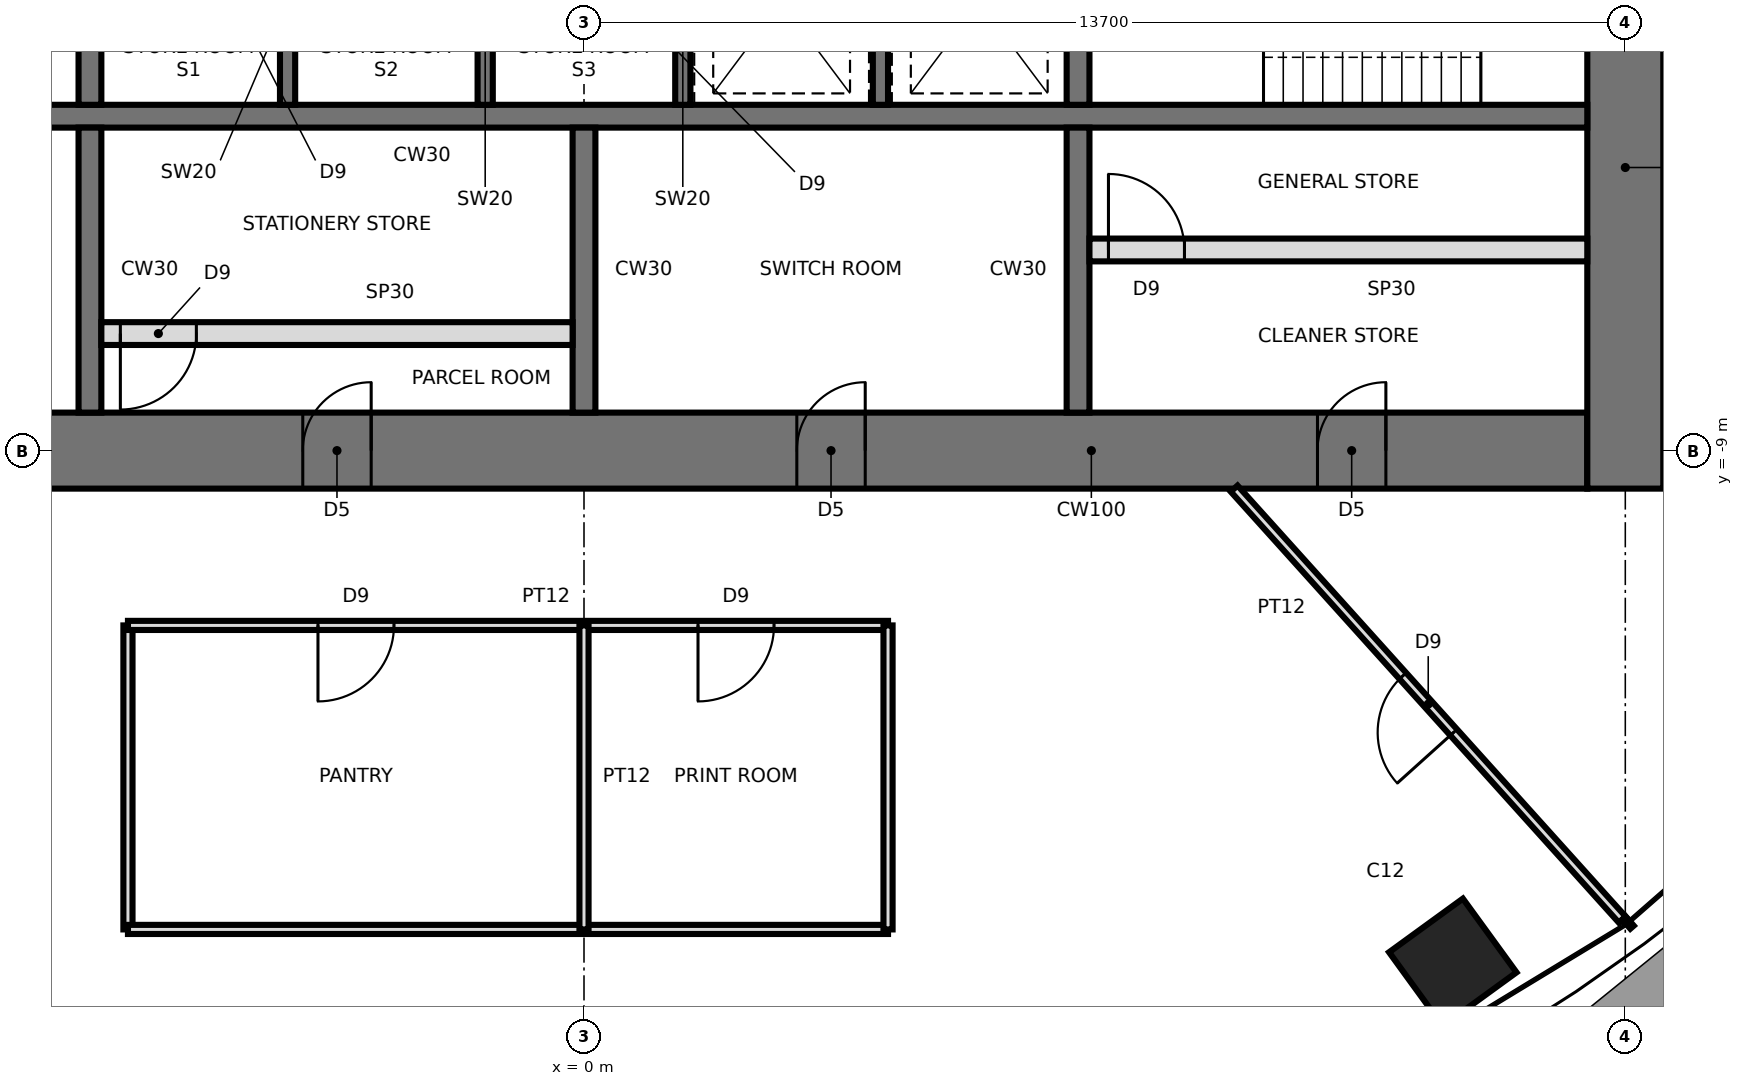
"""IFC4 building model, lengths in metres.
Left out: names, types, materials, properties, quantities, classifications, styles, units other than length and angle.
Written with IfcOpenShell. Run it as: python <this file> out.ifc"""

import sys

from ifc_helpers import new_model, si_unit, direction, frame, frame_2d, origin, origin_2d, place, context, subcontext, project, spatial, rectangle, extrude, element, fill, save


model = new_model("IFC4")
c1 = context("Model", 3, precision=1e-05, world=origin(), true_north=direction((0.0, 1.0)))
c2 = subcontext(c1, "Body", "Model", "MODEL_VIEW")
j1 = project(units=[si_unit("LENGTHUNIT", "METRE"), si_unit("PLANEANGLEUNIT", "RADIAN")], contexts=[c1])
p1 = place(None, origin())
s1 = spatial("IfcSite", under=j1, at=p1, CompositionType="ELEMENT")
p2 = place(p1, origin())
s2 = spatial("IfcBuilding", under=s1, at=p2, CompositionType="ELEMENT")
p3 = place(p2, frame((0.0, 0.0, 264.4)))
s3 = spatial("IfcBuildingStorey", under=s2, at=p3, CompositionType="ELEMENT", Elevation=264.4)
p4 = place(p3, frame((11.43, -15.733, 0.0), z_axis=(0.0, 0.0, 1.0), x_axis=(0.587785252292, -0.809016994375, 0.0)))
e1 = element("IfcColumn", 1, at=p4, inside=s3, PredefinedType="COLUMN", context=c2, shape_type="SweptSolid", body=[
    extrude(rectangle(XDim=1.2, YDim=1.2, at=origin_2d()), origin(), (0.0, 0.0, 1.0), 4.2),
])
p5 = place(p3, frame((-13.2, -9.0, 0.0), z_axis=(0.0, 0.0, 1.0), x_axis=(1.0, 0.0, 0.0)))
e2 = element("IfcWall", 2, at=p5, inside=s3, PredefinedType="SHEAR", context=c2, shape_type="SweptSolid", body=[
    extrude(rectangle(XDim=26.4, YDim=1.0, at=frame_2d((13.2, 0.0))), origin(), (0.0, 0.0, 1.0), 4.2),
])
p6 = place(p5, frame((2.65, 0.0, 0.0)))
e3 = element("IfcOpeningElement", 3, at=p6, cuts=e2, PredefinedType="OPENING", context=c2, shape_type="SweptSolid", body=[
    extrude(rectangle(XDim=0.9, YDim=2.1, at=frame_2d((0.45, 1.05))), frame((0.0, 0.51, 0.0), z_axis=(0.0, -1.0, 0.0), x_axis=(1.0, 0.0, 0.0)), (0.0, 0.0, 1.0), 1.02),
])
p7 = place(p5, frame((9.5, 0.0, 0.0)))
e4 = element("IfcOpeningElement", 4, at=p7, cuts=e2, PredefinedType="OPENING", context=c2, shape_type="SweptSolid", body=[
    extrude(rectangle(XDim=0.9, YDim=2.1, at=frame_2d((0.45, 1.05))), frame((0.0, 0.51, 0.0), z_axis=(0.0, -1.0, 0.0), x_axis=(1.0, 0.0, 0.0)), (0.0, 0.0, 1.0), 1.02),
])
p8 = place(p5, frame((16.0, 0.0, 0.0)))
e5 = element("IfcOpeningElement", 5, at=p8, cuts=e2, PredefinedType="OPENING", context=c2, shape_type="SweptSolid", body=[
    extrude(rectangle(XDim=0.9, YDim=2.1, at=frame_2d((0.45, 1.05))), frame((0.0, 0.51, 0.0), z_axis=(0.0, -1.0, 0.0), x_axis=(1.0, 0.0, 0.0)), (0.0, 0.0, 1.0), 1.02),
])
p9 = place(p5, frame((22.85, 0.0, 0.0)))
e6 = element("IfcOpeningElement", 6, at=p9, cuts=e2, PredefinedType="OPENING", context=c2, shape_type="SweptSolid", body=[
    extrude(rectangle(XDim=0.9, YDim=2.1, at=frame_2d((0.45, 1.05))), frame((0.0, 0.51, 0.0), z_axis=(0.0, -1.0, 0.0), x_axis=(1.0, 0.0, 0.0)), (0.0, 0.0, 1.0), 1.02),
])
p10 = place(p3, frame((13.7, -9.5, 0.0), z_axis=(0.0, 0.0, 1.0), x_axis=(0.0, 1.0, 0.0)))
e7 = element("IfcWall", 7, at=p10, inside=s3, PredefinedType="SHEAR", context=c2, shape_type="SweptSolid", body=[
    extrude(rectangle(XDim=19.0, YDim=1.0, at=frame_2d((9.5, 0.0))), origin(), (0.0, 0.0, 1.0), 4.2),
])
p11 = place(p10, frame((8.6, 0.0, 0.0)))
e8 = element("IfcOpeningElement", 8, at=p11, cuts=e7, PredefinedType="OPENING", context=c2, shape_type="SweptSolid", body=[
    extrude(rectangle(XDim=1.8, YDim=2.4, at=frame_2d((0.9, 1.2))), frame((0.0, 0.51, 0.0), z_axis=(0.0, -1.0, 0.0), x_axis=(1.0, 0.0, 0.0)), (0.0, 0.0, 1.0), 1.02),
])
p12 = place(p3, frame((-13.2, -4.6, 0.0), z_axis=(0.0, 0.0, 1.0), x_axis=(1.0, 0.0, 0.0)))
e9 = element("IfcWall", 9, at=p12, inside=s3, PredefinedType="SHEAR", context=c2, shape_type="SweptSolid", body=[
    extrude(rectangle(XDim=26.4, YDim=0.3, at=frame_2d((13.2, 0.0))), origin(), (0.0, 0.0, 1.0), 4.2),
])
p13 = place(p3, frame((-6.5, -1.75, 0.0), z_axis=(0.0, 0.0, 1.0), x_axis=(0.0, -1.0, 0.0)))
e10 = element("IfcWall", 10, at=p13, inside=s3, PredefinedType="SHEAR", context=c2, shape_type="SweptSolid", body=[
    extrude(rectangle(XDim=2.7, YDim=0.3, at=frame_2d((1.35, 0.0))), origin(), (0.0, 0.0, 1.0), 4.2),
])
p14 = place(p3, frame((-6.5, -4.75, 0.0), z_axis=(0.0, 0.0, 1.0), x_axis=(0.0, -1.0, 0.0)))
e11 = element("IfcWall", 11, at=p14, inside=s3, PredefinedType="SHEAR", context=c2, shape_type="SweptSolid", body=[
    extrude(rectangle(XDim=3.75, YDim=0.3, at=frame_2d((1.875, 0.0))), origin(), (0.0, 0.0, 1.0), 4.2),
])
p15 = place(p3, frame((6.5, -1.75, 0.0), z_axis=(0.0, 0.0, 1.0), x_axis=(0.0, -1.0, 0.0)))
e12 = element("IfcWall", 12, at=p15, inside=s3, PredefinedType="SHEAR", context=c2, shape_type="SweptSolid", body=[
    extrude(rectangle(XDim=2.7, YDim=0.3, at=frame_2d((1.35, 0.0))), origin(), (0.0, 0.0, 1.0), 4.2),
])
p16 = place(p3, frame((6.5, -4.75, 0.0), z_axis=(0.0, 0.0, 1.0), x_axis=(0.0, -1.0, 0.0)))
e13 = element("IfcWall", 13, at=p16, inside=s3, PredefinedType="SHEAR", context=c2, shape_type="SweptSolid", body=[
    extrude(rectangle(XDim=3.75, YDim=0.3, at=frame_2d((1.875, 0.0))), origin(), (0.0, 0.0, 1.0), 4.2),
])
for number, where, z_axis, x_axis in (
    (14, (-3.9, -1.75, 0.0), (0.0, 0.0, 1.0), (0.0, -1.0, 0.0)),
    (15, (-1.3, -1.75, 0.0), (0.0, 0.0, 1.0), (0.0, -1.0, 0.0)),
    (16, (1.3, -1.75, 0.0), (0.0, 0.0, 1.0), (0.0, -1.0, 0.0)),
    (17, (3.9, -1.75, 0.0), (0.0, 0.0, 1.0), (0.0, -1.0, 0.0)),
):
    element("IfcWall", number, at=place(p3, frame(where, z_axis=z_axis, x_axis=x_axis)), inside=s3, PredefinedType="SHEAR", context=c2, shape_type="SweptSolid", body=[
        extrude(rectangle(XDim=2.7, YDim=0.2, at=frame_2d((1.35, 0.0))), origin(), (0.0, 0.0, 1.0), 4.2),
    ])
p17 = place(p3, frame((0.0, -4.75, 0.0), z_axis=(0.0, 0.0, 1.0), x_axis=(0.0, -1.0, 0.0)))
e18 = element("IfcWall", 18, at=p17, inside=s3, PredefinedType="SHEAR", context=c2, shape_type="SweptSolid", body=[
    extrude(rectangle(XDim=3.75, YDim=0.3, at=frame_2d((1.875, 0.0))), origin(), (0.0, 0.0, 1.0), 4.2),
])
p18 = place(p3, frame((-6.35, -7.46, 0.0), z_axis=(0.0, 0.0, 1.0), x_axis=(1.0, 0.0, 0.0)))
e19 = element("IfcWall", 19, at=p18, inside=s3, PredefinedType="PARTITIONING", context=c2, shape_type="SweptSolid", body=[
    extrude(rectangle(XDim=6.2, YDim=0.3, at=frame_2d((3.1, 0.0))), origin(), (0.0, 0.0, 1.0), 4.04),
])
p19 = place(p18, frame((0.25, 0.0, 0.0)))
e20 = element("IfcOpeningElement", 20, at=p19, cuts=e19, PredefinedType="OPENING", context=c2, shape_type="SweptSolid", body=[
    extrude(rectangle(XDim=1.0, YDim=2.4, at=frame_2d((0.5, 1.2))), frame((0.0, 0.16, 0.0), z_axis=(0.0, -1.0, 0.0), x_axis=(1.0, 0.0, 0.0)), (0.0, 0.0, 1.0), 0.32),
])
p20 = place(p3, frame((6.65, -6.36, 0.0), z_axis=(0.0, 0.0, 1.0), x_axis=(1.0, 0.0, 0.0)))
e21 = element("IfcWall", 21, at=p20, inside=s3, PredefinedType="PARTITIONING", context=c2, shape_type="SweptSolid", body=[
    extrude(rectangle(XDim=6.55, YDim=0.3, at=frame_2d((3.275, 0.0))), origin(), (0.0, 0.0, 1.0), 4.04),
])
p21 = place(p20, frame((0.25, 0.0, 0.0)))
e22 = element("IfcOpeningElement", 22, at=p21, cuts=e21, PredefinedType="OPENING", context=c2, shape_type="SweptSolid", body=[
    extrude(rectangle(XDim=1.0, YDim=2.4, at=frame_2d((0.5, 1.2))), frame((0.0, 0.16, 0.0), z_axis=(0.0, -1.0, 0.0), x_axis=(1.0, 0.0, 0.0)), (0.0, 0.0, 1.0), 0.32),
])
p22 = place(p3, frame((-6.0, -15.3, 0.0), z_axis=(0.0, 0.0, 1.0), x_axis=(0.0, 1.0, 0.0)))
e23 = element("IfcWall", 23, at=p22, inside=s3, PredefinedType="PARTITIONING", context=c2, shape_type="SweptSolid", body=[
    extrude(rectangle(XDim=4.0, YDim=0.12, at=frame_2d((2.0, 0.0))), origin(), (0.0, 0.0, 1.0), 4.04),
])
p23 = place(p3, frame((-6.0, -11.3, 0.0), z_axis=(0.0, 0.0, 1.0), x_axis=(1.0, 0.0, 0.0)))
e24 = element("IfcWall", 24, at=p23, inside=s3, PredefinedType="PARTITIONING", context=c2, shape_type="SweptSolid", body=[
    extrude(rectangle(XDim=10.0, YDim=0.12, at=frame_2d((5.0, 0.0))), origin(), (0.0, 0.0, 1.0), 4.04),
])
p24 = place(p23, frame((2.5, 0.0, 0.0)))
e25 = element("IfcOpeningElement", 25, at=p24, cuts=e24, PredefinedType="OPENING", context=c2, shape_type="SweptSolid", body=[
    extrude(rectangle(XDim=1.0, YDim=2.4, at=frame_2d((0.5, 1.2))), frame((0.0, 0.07, 0.0), z_axis=(0.0, -1.0, 0.0), x_axis=(1.0, 0.0, 0.0)), (0.0, 0.0, 1.0), 0.14),
])
p25 = place(p23, frame((7.5, 0.0, 0.0)))
e26 = element("IfcOpeningElement", 26, at=p25, cuts=e24, PredefinedType="OPENING", context=c2, shape_type="SweptSolid", body=[
    extrude(rectangle(XDim=1.0, YDim=2.4, at=frame_2d((0.5, 1.2))), frame((0.0, 0.07, 0.0), z_axis=(0.0, -1.0, 0.0), x_axis=(1.0, 0.0, 0.0)), (0.0, 0.0, 1.0), 0.14),
])
p26 = place(p3, frame((4.0, -15.3, 0.0), z_axis=(0.0, 0.0, 1.0), x_axis=(-1.0, 0.0, 0.0)))
e27 = element("IfcWall", 27, at=p26, inside=s3, PredefinedType="PARTITIONING", context=c2, shape_type="SweptSolid", body=[
    extrude(rectangle(XDim=10.0, YDim=0.12, at=frame_2d((5.0, 0.0))), origin(), (0.0, 0.0, 1.0), 3.637),
])
p27 = place(p3, frame((0.0, -11.3, 0.0), z_axis=(0.0, 0.0, 1.0), x_axis=(0.0, -1.0, 0.0)))
e28 = element("IfcWall", 28, at=p27, inside=s3, PredefinedType="PARTITIONING", context=c2, shape_type="SweptSolid", body=[
    extrude(rectangle(XDim=4.0, YDim=0.12, at=frame_2d((2.0, 0.0))), origin(), (0.0, 0.0, 1.0), 3.24),
])
p28 = place(p3, frame((4.0, -11.3, 0.0), z_axis=(0.0, 0.0, 1.0), x_axis=(0.0, -1.0, 0.0)))
e29 = element("IfcWall", 29, at=p28, inside=s3, PredefinedType="PARTITIONING", context=c2, shape_type="SweptSolid", body=[
    extrude(rectangle(XDim=4.0, YDim=0.12, at=frame_2d((2.0, 0.0))), origin(), (0.0, 0.0, 1.0), 4.04),
])
p29 = place(p3, frame((13.66, -15.171, 0.0), z_axis=(0.0, 0.0, 1.0), x_axis=(-0.669137936348, 0.74313822546, 0.0)))
e30 = element("IfcWall", 30, at=p29, inside=s3, PredefinedType="PARTITIONING", context=c2, shape_type="SweptSolid", body=[
    extrude(rectangle(XDim=7.631, YDim=0.12, at=frame_2d((3.815, 0.0))), origin(), (0.0, 0.0, 1.0), 4.04),
])
p30 = place(p29, frame((3.315, 0.0, 0.0)))
e31 = element("IfcOpeningElement", 31, at=p30, cuts=e30, PredefinedType="OPENING", context=c2, shape_type="SweptSolid", body=[
    extrude(rectangle(XDim=1.0, YDim=2.4, at=frame_2d((0.5, 1.2))), frame((0.0, 0.07, 0.0), z_axis=(0.0, -1.0, 0.0), x_axis=(1.0, 0.0, 0.0)), (0.0, 0.0, 1.0), 0.14),
])
p31 = place(p7, origin())
e32 = element("IfcDoor", 32, at=p31, inside=s3, OperationType="SINGLE_SWING_RIGHT", PredefinedType="DOOR", context=c2, shape_type="SweptSolid", body=[
    extrude(rectangle(XDim=0.82, YDim=2.06, at=frame_2d((0.45, 1.03))), frame((0.0, 0.025, 0.0), z_axis=(0.0, -1.0, 0.0), x_axis=(1.0, 0.0, 0.0)), (0.0, 0.0, 1.0), 0.05),
    extrude(rectangle(XDim=0.04, YDim=2.1, at=frame_2d((0.02, 1.05))), frame((0.0, 0.25, 0.0), z_axis=(0.0, -1.0, 0.0), x_axis=(1.0, 0.0, 0.0)), (0.0, 0.0, 1.0), 0.5),
    extrude(rectangle(XDim=0.04, YDim=2.1, at=frame_2d((0.88, 1.05))), frame((0.0, 0.25, 0.0), z_axis=(0.0, -1.0, 0.0), x_axis=(1.0, 0.0, 0.0)), (0.0, 0.0, 1.0), 0.5),
    extrude(rectangle(XDim=0.82, YDim=0.04, at=frame_2d((0.45, 2.08))), frame((0.0, 0.25, 0.0), z_axis=(0.0, -1.0, 0.0), x_axis=(1.0, 0.0, 0.0)), (0.0, 0.0, 1.0), 0.5),
])
fill(e4, e32)
p32 = place(p8, origin())
e33 = element("IfcDoor", 33, at=p32, inside=s3, OperationType="SINGLE_SWING_RIGHT", PredefinedType="DOOR", context=c2, shape_type="SweptSolid", body=[
    extrude(rectangle(XDim=0.82, YDim=2.06, at=frame_2d((0.45, 1.03))), frame((0.0, 0.025, 0.0), z_axis=(0.0, -1.0, 0.0), x_axis=(1.0, 0.0, 0.0)), (0.0, 0.0, 1.0), 0.05),
    extrude(rectangle(XDim=0.04, YDim=2.1, at=frame_2d((0.02, 1.05))), frame((0.0, 0.25, 0.0), z_axis=(0.0, -1.0, 0.0), x_axis=(1.0, 0.0, 0.0)), (0.0, 0.0, 1.0), 0.5),
    extrude(rectangle(XDim=0.04, YDim=2.1, at=frame_2d((0.88, 1.05))), frame((0.0, 0.25, 0.0), z_axis=(0.0, -1.0, 0.0), x_axis=(1.0, 0.0, 0.0)), (0.0, 0.0, 1.0), 0.5),
    extrude(rectangle(XDim=0.82, YDim=0.04, at=frame_2d((0.45, 2.08))), frame((0.0, 0.25, 0.0), z_axis=(0.0, -1.0, 0.0), x_axis=(1.0, 0.0, 0.0)), (0.0, 0.0, 1.0), 0.5),
])
fill(e5, e33)
p33 = place(p9, origin())
e34 = element("IfcDoor", 34, at=p33, inside=s3, OperationType="SINGLE_SWING_RIGHT", PredefinedType="DOOR", context=c2, shape_type="SweptSolid", body=[
    extrude(rectangle(XDim=0.82, YDim=2.06, at=frame_2d((0.45, 1.03))), frame((0.0, 0.025, 0.0), z_axis=(0.0, -1.0, 0.0), x_axis=(1.0, 0.0, 0.0)), (0.0, 0.0, 1.0), 0.05),
    extrude(rectangle(XDim=0.04, YDim=2.1, at=frame_2d((0.02, 1.05))), frame((0.0, 0.25, 0.0), z_axis=(0.0, -1.0, 0.0), x_axis=(1.0, 0.0, 0.0)), (0.0, 0.0, 1.0), 0.5),
    extrude(rectangle(XDim=0.04, YDim=2.1, at=frame_2d((0.88, 1.05))), frame((0.0, 0.25, 0.0), z_axis=(0.0, -1.0, 0.0), x_axis=(1.0, 0.0, 0.0)), (0.0, 0.0, 1.0), 0.5),
    extrude(rectangle(XDim=0.82, YDim=0.04, at=frame_2d((0.45, 2.08))), frame((0.0, 0.25, 0.0), z_axis=(0.0, -1.0, 0.0), x_axis=(1.0, 0.0, 0.0)), (0.0, 0.0, 1.0), 0.5),
])
fill(e6, e34)
p34 = place(p19, frame((1.0, 0.0, 0.0), z_axis=(0.0, 0.0, 1.0), x_axis=(-1.0, 0.0, 0.0)))
e35 = element("IfcDoor", 35, at=p34, inside=s3, OperationType="SINGLE_SWING_RIGHT", PredefinedType="DOOR", context=c2, shape_type="SweptSolid", body=[
    extrude(rectangle(XDim=1.0, YDim=2.4, at=frame_2d((0.5, 1.2))), frame((0.0, 0.025, 0.0), z_axis=(0.0, -1.0, 0.0), x_axis=(1.0, 0.0, 0.0)), (0.0, 0.0, 1.0), 0.05),
])
fill(e20, e35)
p35 = place(p21, origin())
e36 = element("IfcDoor", 36, at=p35, inside=s3, OperationType="SINGLE_SWING_LEFT", PredefinedType="DOOR", context=c2, shape_type="SweptSolid", body=[
    extrude(rectangle(XDim=1.0, YDim=2.4, at=frame_2d((0.5, 1.2))), frame((0.0, 0.025, 0.0), z_axis=(0.0, -1.0, 0.0), x_axis=(1.0, 0.0, 0.0)), (0.0, 0.0, 1.0), 0.05),
])
fill(e22, e36)
p36 = place(p24, frame((1.0, 0.0, 0.0), z_axis=(0.0, 0.0, 1.0), x_axis=(-1.0, 0.0, 0.0)))
e37 = element("IfcDoor", 37, at=p36, inside=s3, OperationType="SINGLE_SWING_RIGHT", PredefinedType="DOOR", context=c2, shape_type="SweptSolid", body=[
    extrude(rectangle(XDim=1.0, YDim=2.4, at=frame_2d((0.5, 1.2))), frame((0.0, 0.025, 0.0), z_axis=(0.0, -1.0, 0.0), x_axis=(1.0, 0.0, 0.0)), (0.0, 0.0, 1.0), 0.05),
])
fill(e25, e37)
p37 = place(p25, frame((1.0, 0.0, 0.0), z_axis=(0.0, 0.0, 1.0), x_axis=(-1.0, 0.0, 0.0)))
e38 = element("IfcDoor", 38, at=p37, inside=s3, OperationType="SINGLE_SWING_RIGHT", PredefinedType="DOOR", context=c2, shape_type="SweptSolid", body=[
    extrude(rectangle(XDim=1.0, YDim=2.4, at=frame_2d((0.5, 1.2))), frame((0.0, 0.025, 0.0), z_axis=(0.0, -1.0, 0.0), x_axis=(1.0, 0.0, 0.0)), (0.0, 0.0, 1.0), 0.05),
])
fill(e26, e38)
p38 = place(p30, origin())
e39 = element("IfcDoor", 39, at=p38, inside=s3, OperationType="SINGLE_SWING_LEFT", PredefinedType="DOOR", context=c2, shape_type="SweptSolid", body=[
    extrude(rectangle(XDim=1.0, YDim=2.4, at=frame_2d((0.5, 1.2))), frame((0.0, 0.025, 0.0), z_axis=(0.0, -1.0, 0.0), x_axis=(1.0, 0.0, 0.0)), (0.0, 0.0, 1.0), 0.05),
])
fill(e31, e39)
save(model, sys.argv[1])
